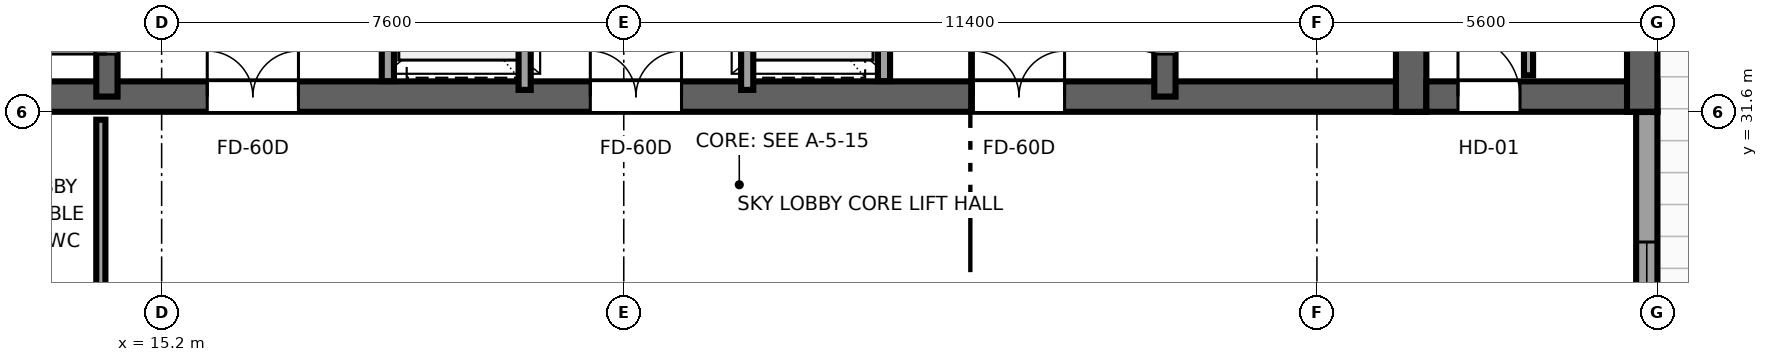
"""IFC4 building model, lengths in metres.
Left out: names, types, materials, properties, quantities, classifications, styles, units other than length and angle.
Written with IfcOpenShell. Run it as: python <this file> out.ifc"""

import sys

from ifc_helpers import new_model, si_unit, direction, frame, frame_2d, origin, place, context, subcontext, project, spatial, rectangle, extrude, source, transform, mapped, element, fill, save


model = new_model("IFC4")
c1 = context("Model", 3, precision=1e-05, world=origin(), true_north=direction((0.0, 1.0)))
c2 = subcontext(c1, "Body", "Model", "MODEL_VIEW")
j1 = project(units=[si_unit("LENGTHUNIT", "METRE"), si_unit("PLANEANGLEUNIT", "RADIAN")], contexts=[c1])
p1 = place(None, origin())
s1 = spatial("IfcSite", under=j1, at=p1, CompositionType="ELEMENT")
p2 = place(p1, origin())
s2 = spatial("IfcBuilding", under=s1, at=p2, CompositionType="ELEMENT")
p3 = place(p2, frame((0.0, 0.0, 205.3)))
s3 = spatial("IfcBuildingStorey", under=s2, at=p3, CompositionType="ELEMENT", Elevation=205.3)
p4 = place(p3, frame((10.0, 31.85, 0.0), z_axis=(0.0, 0.0, 1.0), x_axis=(1.0, 0.0, 0.0)))
e1 = element("IfcWall", 1, at=p4, inside=s3, PredefinedType="SHEAR", context=c2, shape_type="SweptSolid", body=[
    extrude(rectangle(XDim=26.0, YDim=0.5, at=frame_2d((13.0, 0.0))), origin(), (0.0, 0.0, 1.0), 4.4),
])
p5 = place(p4, frame((7.45, 0.0, 0.0), z_axis=(0.0, 0.0, 1.0), x_axis=(-1.0, 0.0, 0.0)))
e2 = element("IfcOpeningElement", 2, at=p5, cuts=e1, PredefinedType="OPENING", context=c2, shape_type="SweptSolid", body=[
    extrude(rectangle(XDim=1.5, YDim=2.04, at=frame_2d((0.75, 1.02))), frame((0.0, 0.26, 0.0), z_axis=(0.0, -1.0, 0.0), x_axis=(1.0, 0.0, 0.0)), (0.0, 0.0, 1.0), 0.52),
])
p6 = place(p4, frame((13.75, 0.0, 0.0), z_axis=(0.0, 0.0, 1.0), x_axis=(-1.0, 0.0, 0.0)))
e3 = element("IfcOpeningElement", 3, at=p6, cuts=e1, PredefinedType="OPENING", context=c2, shape_type="SweptSolid", body=[
    extrude(rectangle(XDim=1.5, YDim=2.04, at=frame_2d((0.75, 1.02))), frame((0.0, 0.26, 0.0), z_axis=(0.0, -1.0, 0.0), x_axis=(1.0, 0.0, 0.0)), (0.0, 0.0, 1.0), 0.52),
])
p7 = place(p4, frame((20.05, 0.0, 0.0), z_axis=(0.0, 0.0, 1.0), x_axis=(-1.0, 0.0, 0.0)))
e4 = element("IfcOpeningElement", 4, at=p7, cuts=e1, PredefinedType="OPENING", context=c2, shape_type="SweptSolid", body=[
    extrude(rectangle(XDim=1.5, YDim=2.04, at=frame_2d((0.75, 1.02))), frame((0.0, 0.26, 0.0), z_axis=(0.0, -1.0, 0.0), x_axis=(1.0, 0.0, 0.0)), (0.0, 0.0, 1.0), 0.52),
])
p8 = place(p3, frame((35.75, 31.6, 0.0), z_axis=(0.0, 0.0, 1.0), x_axis=(0.0, 1.0, 0.0)))
e5 = element("IfcWall", 5, at=p8, inside=s3, PredefinedType="SHEAR", context=c2, shape_type="SweptSolid", body=[
    extrude(rectangle(XDim=13.6, YDim=0.5, at=frame_2d((6.8, 0.0))), origin(), (0.0, 0.0, 1.0), 4.4),
])
p9 = place(p3, frame((14.3, 31.85, 0.0), z_axis=(0.0, 0.0, 1.0), x_axis=(0.0, 1.0, 0.0)))
e6 = element("IfcWall", 6, at=p9, inside=s3, PredefinedType="SHEAR", context=c2, shape_type="SweptSolid", body=[
    extrude(rectangle(XDim=13.1, YDim=0.35, at=frame_2d((6.55, 0.0))), origin(), (0.0, 0.0, 1.0), 4.4),
])
p10 = place(p9, frame((0.7, 0.0, 0.0)))
e7 = element("IfcOpeningElement", 7, at=p10, cuts=e6, PredefinedType="OPENING", context=c2, shape_type="SweptSolid", body=[
    extrude(rectangle(XDim=1.1, YDim=2.12, at=frame_2d((0.55, 1.06))), frame((0.0, 0.185, 0.0), z_axis=(0.0, -1.0, 0.0), x_axis=(1.0, 0.0, 0.0)), (0.0, 0.0, 1.0), 0.37),
])
p11 = place(p3, frame((31.7, 31.85, 0.0), z_axis=(0.0, 0.0, 1.0), x_axis=(0.0, 1.0, 0.0)))
e8 = element("IfcWall", 8, at=p11, inside=s3, PredefinedType="SHEAR", context=c2, shape_type="SweptSolid", body=[
    extrude(rectangle(XDim=13.1, YDim=0.35, at=frame_2d((6.55, 0.0))), origin(), (0.0, 0.0, 1.0), 4.4),
])
p12 = place(p11, frame((1.8, 0.0, 0.0), z_axis=(0.0, 0.0, 1.0), x_axis=(-1.0, 0.0, 0.0)))
e9 = element("IfcOpeningElement", 9, at=p12, cuts=e8, PredefinedType="OPENING", context=c2, shape_type="SweptSolid", body=[
    extrude(rectangle(XDim=1.1, YDim=2.12, at=frame_2d((0.55, 1.06))), frame((0.0, 0.185, 0.0), z_axis=(0.0, -1.0, 0.0), x_axis=(1.0, 0.0, 0.0)), (0.0, 0.0, 1.0), 0.37),
])
p13 = place(p3, frame((36.0, 31.85, 0.0), z_axis=(0.0, 0.0, 1.0), x_axis=(1.0, 0.0, 0.0)))
e10 = element("IfcWall", 10, at=p13, inside=s3, PredefinedType="SHEAR", context=c2, shape_type="SweptSolid", body=[
    extrude(rectangle(XDim=3.8, YDim=0.5, at=frame_2d((1.9, 0.0))), origin(), (0.0, 0.0, 1.0), 4.4),
])
p14 = place(p13, frame((1.54, 0.0, 0.0), z_axis=(0.0, 0.0, 1.0), x_axis=(-1.0, 0.0, 0.0)))
e11 = element("IfcOpeningElement", 11, at=p14, cuts=e10, PredefinedType="OPENING", context=c2, shape_type="SweptSolid", body=[
    extrude(rectangle(XDim=1.02, YDim=2.03, at=frame_2d((0.51, 1.015))), frame((0.0, 0.26, 0.0), z_axis=(0.0, -1.0, 0.0), x_axis=(1.0, 0.0, 0.0)), (0.0, 0.0, 1.0), 0.52),
])
p15 = place(p3, frame((39.55, 31.6, 0.0), z_axis=(0.0, 0.0, 1.0), x_axis=(0.0, 1.0, 0.0)))
e12 = element("IfcWall", 12, at=p15, inside=s3, PredefinedType="SHEAR", context=c2, shape_type="SweptSolid", body=[
    extrude(rectangle(XDim=11.55, YDim=0.5, at=frame_2d((5.775, 0.0))), origin(), (0.0, 0.0, 1.0), 4.4),
])
p16 = place(p3, frame((39.625, 7.017, 0.0), z_axis=(0.0, 0.0, 1.0), x_axis=(0.0, 1.0, 0.0)))
e13 = element("IfcWall", 13, at=p16, inside=s3, PredefinedType="SOLIDWALL", context=c2, shape_type="SweptSolid", body=[
    extrude(rectangle(XDim=24.579, YDim=0.35, at=frame_2d((12.29, 0.0))), origin(), (0.0, 0.0, 1.0), 4.22),
])
p17 = place(p16, frame((5.983, 0.0, 0.0), z_axis=(0.0, 0.0, 1.0), x_axis=(-1.0, 0.0, 0.0)))
e14 = element("IfcOpeningElement", 14, at=p17, cuts=e13, PredefinedType="OPENING", context=c2, shape_type="SweptSolid", body=[
    extrude(rectangle(XDim=1.8, YDim=2.15, at=frame_2d((0.9, 1.075))), frame((0.0, 0.185, 0.0), z_axis=(0.0, -1.0, 0.0), x_axis=(1.0, 0.0, 0.0)), (0.0, 0.0, 1.0), 0.37),
])
p18 = place(p16, frame((10.939, 0.0, 0.68)))
e15 = element("IfcOpeningElement", 15, at=p18, cuts=e13, PredefinedType="OPENING", context=c2, shape_type="SweptSolid", body=[
    extrude(rectangle(XDim=2.7, YDim=1.95, at=frame_2d((1.35, 0.975))), frame((0.0, 0.185, 0.0), z_axis=(0.0, -1.0, 0.0), x_axis=(1.0, 0.0, 0.0)), (0.0, 0.0, 1.0), 0.37),
])
p19 = place(p16, frame((19.741, 0.0, 0.68)))
e16 = element("IfcOpeningElement", 16, at=p19, cuts=e13, PredefinedType="OPENING", context=c2, shape_type="SweptSolid", body=[
    extrude(rectangle(XDim=2.7, YDim=1.95, at=frame_2d((1.35, 0.975))), frame((0.0, 0.185, 0.0), z_axis=(0.0, -1.0, 0.0), x_axis=(1.0, 0.0, 0.0)), (0.0, 0.0, 1.0), 0.37),
])
for number, where, z_axis, x_axis in (
    (17, (18.92, 32.104, 0.0), (0.0, 0.0, 1.0), (0.0, 1.0, 0.0)),
    (18, (27.08, 32.104, 0.0), (0.0, 0.0, 1.0), (0.0, 1.0, 0.0)),
):
    element("IfcWall", number, at=place(p3, frame(where, z_axis=z_axis, x_axis=x_axis)), inside=s3, PredefinedType="SOLIDWALL", context=c2, shape_type="SweptSolid", body=[
        extrude(rectangle(XDim=4.046, YDim=0.2, at=frame_2d((2.023, 0.0))), origin(), (0.0, 0.0, 1.0), 4.22),
    ])
p20 = place(p3, frame((21.17, 31.96, 0.0), z_axis=(0.0, 0.0, 1.0), x_axis=(0.0, 1.0, 0.0)))
e19 = element("IfcWall", 19, at=p20, inside=s3, PredefinedType="SOLIDWALL", context=c2, shape_type="SweptSolid", body=[
    extrude(rectangle(XDim=12.58, YDim=0.2, at=frame_2d((6.29, 0.0))), origin(), (0.0, 0.0, 1.0), 4.22),
])
p21 = place(p20, frame((0.74, 0.0, 0.0)))
e20 = element("IfcOpeningElement", 20, at=p21, cuts=e19, PredefinedType="OPENING", context=c2, shape_type="SweptSolid", body=[
    extrude(rectangle(XDim=1.1, YDim=2.12, at=frame_2d((0.55, 1.06))), frame((0.0, 0.11, 0.0), z_axis=(0.0, -1.0, 0.0), x_axis=(1.0, 0.0, 0.0)), (0.0, 0.0, 1.0), 0.22),
])
p22 = place(p20, frame((3.24, 0.0, 0.0)))
e21 = element("IfcOpeningElement", 21, at=p22, cuts=e19, PredefinedType="OPENING", context=c2, shape_type="SweptSolid", body=[
    extrude(rectangle(XDim=1.1, YDim=2.12, at=frame_2d((0.55, 1.06))), frame((0.0, 0.11, 0.0), z_axis=(0.0, -1.0, 0.0), x_axis=(1.0, 0.0, 0.0)), (0.0, 0.0, 1.0), 0.22),
])
p23 = place(p3, frame((24.83, 31.96, 0.0), z_axis=(0.0, 0.0, 1.0), x_axis=(0.0, 1.0, 0.0)))
e22 = element("IfcWall", 22, at=p23, inside=s3, PredefinedType="SOLIDWALL", context=c2, shape_type="SweptSolid", body=[
    extrude(rectangle(XDim=12.58, YDim=0.2, at=frame_2d((6.29, 0.0))), origin(), (0.0, 0.0, 1.0), 4.22),
])
p24 = place(p23, frame((0.74, 0.0, 0.0)))
e23 = element("IfcOpeningElement", 23, at=p24, cuts=e22, PredefinedType="OPENING", context=c2, shape_type="SweptSolid", body=[
    extrude(rectangle(XDim=1.1, YDim=2.12, at=frame_2d((0.55, 1.06))), frame((0.0, 0.11, 0.0), z_axis=(0.0, -1.0, 0.0), x_axis=(1.0, 0.0, 0.0)), (0.0, 0.0, 1.0), 0.22),
])
p25 = place(p23, frame((3.24, 0.0, 0.0)))
e24 = element("IfcOpeningElement", 24, at=p25, cuts=e22, PredefinedType="OPENING", context=c2, shape_type="SweptSolid", body=[
    extrude(rectangle(XDim=1.1, YDim=2.12, at=frame_2d((0.55, 1.06))), frame((0.0, 0.11, 0.0), z_axis=(0.0, -1.0, 0.0), x_axis=(1.0, 0.0, 0.0)), (0.0, 0.0, 1.0), 0.22),
])
p26 = place(p3, frame((37.68, 32.2, 0.0), z_axis=(0.0, 0.0, 1.0), x_axis=(0.0, 1.0, 0.0)))
e25 = element("IfcWall", 25, at=p26, inside=s3, PredefinedType="PARTITIONING", context=c2, shape_type="SweptSolid", body=[
    extrude(rectangle(XDim=6.0, YDim=0.15, at=frame_2d((3.0, 0.0))), origin(), (0.0, 0.0, 1.0), 4.22),
])
p27 = place(p26, frame((2.49, 0.0, 0.0)))
e26 = element("IfcOpeningElement", 26, at=p27, cuts=e25, PredefinedType="OPENING", context=c2, shape_type="SweptSolid", body=[
    extrude(rectangle(XDim=1.02, YDim=2.03, at=frame_2d((0.51, 1.015))), frame((0.0, 0.085, 0.0), z_axis=(0.0, -1.0, 0.0), x_axis=(1.0, 0.0, 0.0)), (0.0, 0.0, 1.0), 0.17),
])
p28 = place(p3, frame((14.2, 28.33, 0.0), z_axis=(0.0, 0.0, 1.0), x_axis=(0.0, 1.0, 0.0)))
e27 = element("IfcWall", 27, at=p28, inside=s3, PredefinedType="PARTITIONING", context=c2, shape_type="SweptSolid", body=[
    extrude(rectangle(XDim=3.14, YDim=0.15, at=frame_2d((1.57, 0.0))), origin(), (0.0, 0.0, 1.0), 4.22),
])
m1 = source(origin(), c2, "Body", "SweptSolid", [
    extrude(rectangle(XDim=2.7, YDim=1.95, at=frame_2d((1.35, 0.975))), frame((0.0, 0.09, 0.0), z_axis=(0.0, -1.0, 0.0), x_axis=(1.0, 0.0, 0.0)), (0.0, 0.0, 1.0), 0.06),
])
p29 = place(p19, origin())
e28 = element("IfcWindow", 28, at=p29, inside=s3, PartitioningType="TRIPLE_PANEL_HORIZONTAL", PredefinedType="WINDOW", context=c2, shape_type="MappedRepresentation", body=[
    mapped(m1, transform((0.0, 0.0, 0.0), x_axis=(1.0, 0.0, 0.0), y_axis=(0.0, 1.0, 0.0), z_axis=(0.0, 0.0, 1.0), scale=1.0)),
])
fill(e16, e28)
m2 = source(origin(), c2, "Body", "SweptSolid", [
    extrude(rectangle(XDim=1.1, YDim=2.12, at=frame_2d((0.55, 1.06))), frame((0.0, 0.025, 0.0), z_axis=(0.0, -1.0, 0.0), x_axis=(1.0, 0.0, 0.0)), (0.0, 0.0, 1.0), 0.05),
])
p30 = place(p10, origin())
e29 = element("IfcDoor", 29, at=p30, inside=s3, OperationType="SINGLE_SWING_LEFT", PredefinedType="DOOR", context=c2, shape_type="MappedRepresentation", body=[
    mapped(m2, transform((0.0, 0.0, 0.0), x_axis=(1.0, 0.0, 0.0), y_axis=(0.0, 1.0, 0.0), z_axis=(0.0, 0.0, 1.0), scale=1.0)),
])
fill(e7, e29)
p31 = place(p12, origin())
e30 = element("IfcDoor", 30, at=p31, inside=s3, OperationType="SINGLE_SWING_RIGHT", PredefinedType="DOOR", context=c2, shape_type="MappedRepresentation", body=[
    mapped(m2, transform((0.0, 0.0, 0.0), x_axis=(1.0, 0.0, 0.0), y_axis=(0.0, 1.0, 0.0), z_axis=(0.0, 0.0, 1.0), scale=1.0)),
])
fill(e9, e30)
m3 = source(origin(), c2, "Body", "SweptSolid", [
    extrude(rectangle(XDim=1.5, YDim=2.04, at=frame_2d((0.75, 1.02))), frame((0.0, 0.025, 0.0), z_axis=(0.0, -1.0, 0.0), x_axis=(1.0, 0.0, 0.0)), (0.0, 0.0, 1.0), 0.05),
])
p32 = place(p5, origin())
e31 = element("IfcDoor", 31, at=p32, inside=s3, OperationType="DOUBLE_DOOR_SINGLE_SWING", PredefinedType="DOOR", context=c2, shape_type="MappedRepresentation", body=[
    mapped(m3, transform((0.0, 0.0, 0.0), x_axis=(1.0, 0.0, 0.0), y_axis=(0.0, 1.0, 0.0), z_axis=(0.0, 0.0, 1.0), scale=1.0)),
])
fill(e2, e31)
p33 = place(p6, origin())
e32 = element("IfcDoor", 32, at=p33, inside=s3, OperationType="DOUBLE_DOOR_SINGLE_SWING", PredefinedType="DOOR", context=c2, shape_type="MappedRepresentation", body=[
    mapped(m3, transform((0.0, 0.0, 0.0), x_axis=(1.0, 0.0, 0.0), y_axis=(0.0, 1.0, 0.0), z_axis=(0.0, 0.0, 1.0), scale=1.0)),
])
fill(e3, e32)
p34 = place(p7, origin())
e33 = element("IfcDoor", 33, at=p34, inside=s3, OperationType="DOUBLE_DOOR_SINGLE_SWING", PredefinedType="DOOR", context=c2, shape_type="MappedRepresentation", body=[
    mapped(m3, transform((0.0, 0.0, 0.0), x_axis=(1.0, 0.0, 0.0), y_axis=(0.0, 1.0, 0.0), z_axis=(0.0, 0.0, 1.0), scale=1.0)),
])
fill(e4, e33)
m4 = source(origin(), c2, "Body", "SweptSolid", [
    extrude(rectangle(XDim=1.02, YDim=2.03, at=frame_2d((0.51, 1.015))), frame((0.0, 0.025, 0.0), z_axis=(0.0, -1.0, 0.0), x_axis=(1.0, 0.0, 0.0)), (0.0, 0.0, 1.0), 0.05),
])
p35 = place(p14, origin())
e34 = element("IfcDoor", 34, at=p35, inside=s3, OperationType="SINGLE_SWING_LEFT", PredefinedType="DOOR", context=c2, shape_type="MappedRepresentation", body=[
    mapped(m4, transform((0.0, 0.0, 0.0), x_axis=(1.0, 0.0, 0.0), y_axis=(0.0, 1.0, 0.0), z_axis=(0.0, 0.0, 1.0), scale=1.0)),
])
fill(e11, e34)
save(model, sys.argv[1])
